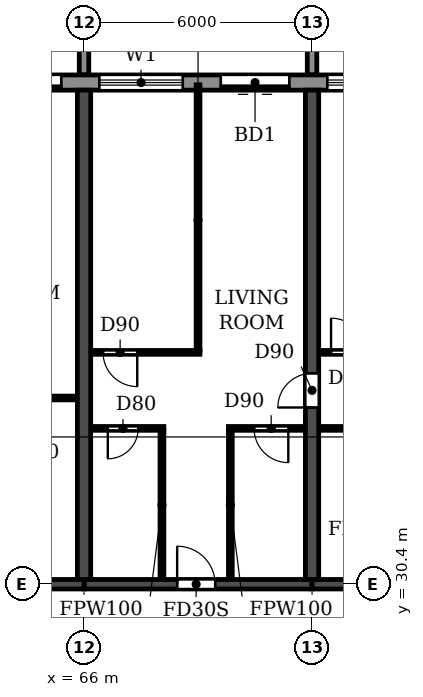
"""IFC4 building model, lengths in metres.
Left out: names, types, materials, properties, quantities, classifications, styles, units other than length and angle.
Written with IfcOpenShell. Run it as: python <this file> out.ifc"""

import sys

from ifc_helpers import new_model, si_unit, direction, frame, frame_2d, origin, place, context, subcontext, project, spatial, polyline, rectangle, outline, extrude, source, transform, mapped, element, fill, save


model = new_model("IFC4")
c1 = context("Model", 3, precision=1e-05, world=origin(), true_north=direction((0.0, 1.0)))
c2 = subcontext(c1, "Body", "Model", "MODEL_VIEW")
j1 = project(units=[si_unit("LENGTHUNIT", "METRE"), si_unit("PLANEANGLEUNIT", "RADIAN")], contexts=[c1])
p1 = place(None, origin())
s1 = spatial("IfcSite", under=j1, at=p1, CompositionType="ELEMENT")
p2 = place(p1, origin())
s2 = spatial("IfcBuilding", under=s1, at=p2, CompositionType="ELEMENT")
p3 = place(p2, frame((0.0, 0.0, 112.5)))
s3 = spatial("IfcBuildingStorey", under=s2, at=p3, CompositionType="ELEMENT", Elevation=112.5)
p4 = place(p3, frame((66.0, 30.525, 0.0), z_axis=(0.0, 0.0, 1.0), x_axis=(0.0, 1.0, 0.0)))
e1 = element("IfcWall", 1, at=p4, inside=s3, PredefinedType="SHEAR", context=c2, shape_type="SweptSolid", body=[
    extrude(rectangle(XDim=12.875, YDim=0.35, at=frame_2d((6.438, 0.0))), origin(), (0.0, 0.0, 1.0), 2.95),
])
p5 = place(p3, frame((72.0, 30.525, 0.0), z_axis=(0.0, 0.0, 1.0), x_axis=(0.0, 1.0, 0.0)))
e2 = element("IfcWall", 2, at=p5, inside=s3, PredefinedType="SHEAR", context=c2, shape_type="SweptSolid", body=[
    extrude(rectangle(XDim=12.875, YDim=0.35, at=frame_2d((6.438, 0.0))), origin(), (0.0, 0.0, 1.0), 2.95),
])
p6 = place(p5, frame((4.525, 0.0, 0.0)))
e3 = element("IfcOpeningElement", 3, at=p6, cuts=e2, PredefinedType="OPENING", context=c2, shape_type="SweptSolid", body=[
    extrude(rectangle(XDim=0.9, YDim=2.1, at=frame_2d((0.45, 1.05))), frame((0.0, 0.185, 0.0), z_axis=(0.0, -1.0, 0.0), x_axis=(1.0, 0.0, 0.0)), (0.0, 0.0, 1.0), 0.37),
])
p7 = place(p3, frame((60.0, 30.4, 0.0), z_axis=(0.0, 0.0, 1.0), x_axis=(1.0, 0.0, 0.0)))
e4 = element("IfcWall", 4, at=p7, inside=s3, PredefinedType="SHEAR", context=c2, shape_type="SweptSolid", body=[
    extrude(rectangle(XDim=6.0, YDim=0.25, at=frame_2d((3.0, 0.0))), origin(), (0.0, 0.0, 1.0), 2.35),
])
p8 = place(p7, frame((2.45, 0.0, 0.0)))
e5 = element("IfcOpeningElement", 5, at=p8, cuts=e4, PredefinedType="OPENING", context=c2, shape_type="SweptSolid", body=[
    extrude(rectangle(XDim=1.0, YDim=2.1, at=frame_2d((0.5, 1.05))), frame((0.0, 0.135, 0.0), z_axis=(0.0, -1.0, 0.0), x_axis=(1.0, 0.0, 0.0)), (0.0, 0.0, 1.0), 0.27),
])
p9 = place(p3, frame((66.0, 30.4, 0.0), z_axis=(0.0, 0.0, 1.0), x_axis=(1.0, 0.0, 0.0)))
e6 = element("IfcWall", 6, at=p9, inside=s3, PredefinedType="SHEAR", context=c2, shape_type="SweptSolid", body=[
    extrude(rectangle(XDim=6.0, YDim=0.25, at=frame_2d((3.0, 0.0))), origin(), (0.0, 0.0, 1.0), 2.35),
])
p10 = place(p9, frame((2.45, 0.0, 0.0)))
e7 = element("IfcOpeningElement", 7, at=p10, cuts=e6, PredefinedType="OPENING", context=c2, shape_type="SweptSolid", body=[
    extrude(rectangle(XDim=1.0, YDim=2.1, at=frame_2d((0.5, 1.05))), frame((0.0, 0.135, 0.0), z_axis=(0.0, -1.0, 0.0), x_axis=(1.0, 0.0, 0.0)), (0.0, 0.0, 1.0), 0.27),
])
p11 = place(p3, frame((72.0, 30.4, 0.0), z_axis=(0.0, 0.0, 1.0), x_axis=(1.0, 0.0, 0.0)))
e8 = element("IfcWall", 8, at=p11, inside=s3, PredefinedType="SHEAR", context=c2, shape_type="SweptSolid", body=[
    extrude(rectangle(XDim=6.0, YDim=0.25, at=frame_2d((3.0, 0.0))), origin(), (0.0, 0.0, 1.0), 2.35),
])
p12 = place(p3, frame((85.317, 43.6, 0.0), z_axis=(0.0, 0.0, 1.0), x_axis=(-1.0, 0.0, 0.0)))
e9 = element("IfcWall", 9, at=p12, inside=s3, PredefinedType="STANDARD", context=c2, shape_type="SweptSolid", body=[
    extrude(rectangle(XDim=68.634, YDim=0.4, at=frame_2d((34.317, 0.0))), origin(), (0.0, 0.0, 1.0), 2.95),
])
p13 = place(p12, frame((64.917, 0.0, 0.0)))
e10 = element("IfcOpeningElement", 10, at=p13, cuts=e9, PredefinedType="OPENING", context=c2, shape_type="SweptSolid", body=[
    extrude(rectangle(XDim=1.8, YDim=2.4, at=frame_2d((0.9, 1.2))), frame((0.0, 0.21, 0.0), z_axis=(0.0, -1.0, 0.0), x_axis=(1.0, 0.0, 0.0)), (0.0, 0.0, 1.0), 0.42),
])
p14 = place(p12, frame((61.717, 0.0, 0.9)))
e11 = element("IfcOpeningElement", 11, at=p14, cuts=e9, PredefinedType="OPENING", context=c2, shape_type="SweptSolid", body=[
    extrude(rectangle(XDim=2.2, YDim=1.5, at=frame_2d((1.1, 0.75))), frame((0.0, 0.21, 0.0), z_axis=(0.0, -1.0, 0.0), x_axis=(1.0, 0.0, 0.0)), (0.0, 0.0, 1.0), 0.42),
])
p15 = place(p12, frame((58.717, 0.0, 0.9)))
e12 = element("IfcOpeningElement", 12, at=p15, cuts=e9, PredefinedType="OPENING", context=c2, shape_type="SweptSolid", body=[
    extrude(rectangle(XDim=2.2, YDim=1.5, at=frame_2d((1.1, 0.75))), frame((0.0, 0.21, 0.0), z_axis=(0.0, -1.0, 0.0), x_axis=(1.0, 0.0, 0.0)), (0.0, 0.0, 1.0), 0.42),
])
p16 = place(p12, frame((55.917, 0.0, 0.0)))
e13 = element("IfcOpeningElement", 13, at=p16, cuts=e9, PredefinedType="OPENING", context=c2, shape_type="SweptSolid", body=[
    extrude(rectangle(XDim=1.8, YDim=2.4, at=frame_2d((0.9, 1.2))), frame((0.0, 0.21, 0.0), z_axis=(0.0, -1.0, 0.0), x_axis=(1.0, 0.0, 0.0)), (0.0, 0.0, 1.0), 0.42),
])
p17 = place(p12, frame((52.917, 0.0, 0.0)))
e14 = element("IfcOpeningElement", 14, at=p17, cuts=e9, PredefinedType="OPENING", context=c2, shape_type="SweptSolid", body=[
    extrude(rectangle(XDim=1.8, YDim=2.4, at=frame_2d((0.9, 1.2))), frame((0.0, 0.21, 0.0), z_axis=(0.0, -1.0, 0.0), x_axis=(1.0, 0.0, 0.0)), (0.0, 0.0, 1.0), 0.42),
])
p18 = place(p12, frame((49.717, 0.0, 0.9)))
e15 = element("IfcOpeningElement", 15, at=p18, cuts=e9, PredefinedType="OPENING", context=c2, shape_type="SweptSolid", body=[
    extrude(rectangle(XDim=2.2, YDim=1.5, at=frame_2d((1.1, 0.75))), frame((0.0, 0.21, 0.0), z_axis=(0.0, -1.0, 0.0), x_axis=(1.0, 0.0, 0.0)), (0.0, 0.0, 1.0), 0.42),
])
p19 = place(p12, frame((46.717, 0.0, 0.9)))
e16 = element("IfcOpeningElement", 16, at=p19, cuts=e9, PredefinedType="OPENING", context=c2, shape_type="SweptSolid", body=[
    extrude(rectangle(XDim=2.2, YDim=1.5, at=frame_2d((1.1, 0.75))), frame((0.0, 0.21, 0.0), z_axis=(0.0, -1.0, 0.0), x_axis=(1.0, 0.0, 0.0)), (0.0, 0.0, 1.0), 0.42),
])
p20 = place(p12, frame((43.917, 0.0, 0.0)))
e17 = element("IfcOpeningElement", 17, at=p20, cuts=e9, PredefinedType="OPENING", context=c2, shape_type="SweptSolid", body=[
    extrude(rectangle(XDim=1.8, YDim=2.4, at=frame_2d((0.9, 1.2))), frame((0.0, 0.21, 0.0), z_axis=(0.0, -1.0, 0.0), x_axis=(1.0, 0.0, 0.0)), (0.0, 0.0, 1.0), 0.42),
])
p21 = place(p12, frame((40.717, 0.0, 0.9)))
e18 = element("IfcOpeningElement", 18, at=p21, cuts=e9, PredefinedType="OPENING", context=c2, shape_type="SweptSolid", body=[
    extrude(rectangle(XDim=2.2, YDim=1.5, at=frame_2d((1.1, 0.75))), frame((0.0, 0.21, 0.0), z_axis=(0.0, -1.0, 0.0), x_axis=(1.0, 0.0, 0.0)), (0.0, 0.0, 1.0), 0.42),
])
p22 = place(p12, frame((37.717, 0.0, 0.9)))
e19 = element("IfcOpeningElement", 19, at=p22, cuts=e9, PredefinedType="OPENING", context=c2, shape_type="SweptSolid", body=[
    extrude(rectangle(XDim=2.2, YDim=1.5, at=frame_2d((1.1, 0.75))), frame((0.0, 0.21, 0.0), z_axis=(0.0, -1.0, 0.0), x_axis=(1.0, 0.0, 0.0)), (0.0, 0.0, 1.0), 0.42),
])
p23 = place(p12, frame((34.917, 0.0, 0.0)))
e20 = element("IfcOpeningElement", 20, at=p23, cuts=e9, PredefinedType="OPENING", context=c2, shape_type="SweptSolid", body=[
    extrude(rectangle(XDim=1.8, YDim=2.4, at=frame_2d((0.9, 1.2))), frame((0.0, 0.21, 0.0), z_axis=(0.0, -1.0, 0.0), x_axis=(1.0, 0.0, 0.0)), (0.0, 0.0, 1.0), 0.42),
])
p24 = place(p12, frame((31.717, 0.0, 0.9)))
e21 = element("IfcOpeningElement", 21, at=p24, cuts=e9, PredefinedType="OPENING", context=c2, shape_type="SweptSolid", body=[
    extrude(rectangle(XDim=2.2, YDim=1.5, at=frame_2d((1.1, 0.75))), frame((0.0, 0.21, 0.0), z_axis=(0.0, -1.0, 0.0), x_axis=(1.0, 0.0, 0.0)), (0.0, 0.0, 1.0), 0.42),
])
p25 = place(p12, frame((28.917, 0.0, 0.0)))
e22 = element("IfcOpeningElement", 22, at=p25, cuts=e9, PredefinedType="OPENING", context=c2, shape_type="SweptSolid", body=[
    extrude(rectangle(XDim=1.8, YDim=2.4, at=frame_2d((0.9, 1.2))), frame((0.0, 0.21, 0.0), z_axis=(0.0, -1.0, 0.0), x_axis=(1.0, 0.0, 0.0)), (0.0, 0.0, 1.0), 0.42),
])
p26 = place(p12, frame((25.717, 0.0, 0.9)))
e23 = element("IfcOpeningElement", 23, at=p26, cuts=e9, PredefinedType="OPENING", context=c2, shape_type="SweptSolid", body=[
    extrude(rectangle(XDim=2.2, YDim=1.5, at=frame_2d((1.1, 0.75))), frame((0.0, 0.21, 0.0), z_axis=(0.0, -1.0, 0.0), x_axis=(1.0, 0.0, 0.0)), (0.0, 0.0, 1.0), 0.42),
])
p27 = place(p12, frame((22.717, 0.0, 0.9)))
e24 = element("IfcOpeningElement", 24, at=p27, cuts=e9, PredefinedType="OPENING", context=c2, shape_type="SweptSolid", body=[
    extrude(rectangle(XDim=2.2, YDim=1.5, at=frame_2d((1.1, 0.75))), frame((0.0, 0.21, 0.0), z_axis=(0.0, -1.0, 0.0), x_axis=(1.0, 0.0, 0.0)), (0.0, 0.0, 1.0), 0.42),
])
p28 = place(p12, frame((19.917, 0.0, 0.0)))
e25 = element("IfcOpeningElement", 25, at=p28, cuts=e9, PredefinedType="OPENING", context=c2, shape_type="SweptSolid", body=[
    extrude(rectangle(XDim=1.8, YDim=2.4, at=frame_2d((0.9, 1.2))), frame((0.0, 0.21, 0.0), z_axis=(0.0, -1.0, 0.0), x_axis=(1.0, 0.0, 0.0)), (0.0, 0.0, 1.0), 0.42),
])
p29 = place(p12, frame((16.717, 0.0, 0.9)))
e26 = element("IfcOpeningElement", 26, at=p29, cuts=e9, PredefinedType="OPENING", context=c2, shape_type="SweptSolid", body=[
    extrude(rectangle(XDim=2.2, YDim=1.5, at=frame_2d((1.1, 0.75))), frame((0.0, 0.21, 0.0), z_axis=(0.0, -1.0, 0.0), x_axis=(1.0, 0.0, 0.0)), (0.0, 0.0, 1.0), 0.42),
])
p30 = place(p12, frame((13.917, 0.0, 0.0)))
e27 = element("IfcOpeningElement", 27, at=p30, cuts=e9, PredefinedType="OPENING", context=c2, shape_type="SweptSolid", body=[
    extrude(rectangle(XDim=1.8, YDim=2.4, at=frame_2d((0.9, 1.2))), frame((0.0, 0.21, 0.0), z_axis=(0.0, -1.0, 0.0), x_axis=(1.0, 0.0, 0.0)), (0.0, 0.0, 1.0), 0.42),
])
p31 = place(p12, frame((10.717, 0.0, 0.9)))
e28 = element("IfcOpeningElement", 28, at=p31, cuts=e9, PredefinedType="OPENING", context=c2, shape_type="SweptSolid", body=[
    extrude(rectangle(XDim=2.2, YDim=1.5, at=frame_2d((1.1, 0.75))), frame((0.0, 0.21, 0.0), z_axis=(0.0, -1.0, 0.0), x_axis=(1.0, 0.0, 0.0)), (0.0, 0.0, 1.0), 0.42),
])
p32 = place(p12, frame((7.717, 0.0, 0.9)))
e29 = element("IfcOpeningElement", 29, at=p32, cuts=e9, PredefinedType="OPENING", context=c2, shape_type="SweptSolid", body=[
    extrude(rectangle(XDim=2.2, YDim=1.5, at=frame_2d((1.1, 0.75))), frame((0.0, 0.21, 0.0), z_axis=(0.0, -1.0, 0.0), x_axis=(1.0, 0.0, 0.0)), (0.0, 0.0, 1.0), 0.42),
])
p33 = place(p12, frame((4.917, 0.0, 0.0)))
e30 = element("IfcOpeningElement", 30, at=p33, cuts=e9, PredefinedType="OPENING", context=c2, shape_type="SweptSolid", body=[
    extrude(rectangle(XDim=1.8, YDim=2.4, at=frame_2d((0.9, 1.2))), frame((0.0, 0.21, 0.0), z_axis=(0.0, -1.0, 0.0), x_axis=(1.0, 0.0, 0.0)), (0.0, 0.0, 1.0), 0.42),
])
p34 = place(p12, frame((1.717, 0.0, 0.9)))
e31 = element("IfcOpeningElement", 31, at=p34, cuts=e9, PredefinedType="OPENING", context=c2, shape_type="SweptSolid", body=[
    extrude(rectangle(XDim=2.2, YDim=1.5, at=frame_2d((1.1, 0.75))), frame((0.0, 0.21, 0.0), z_axis=(0.0, -1.0, 0.0), x_axis=(1.0, 0.0, 0.0)), (0.0, 0.0, 1.0), 0.42),
])
m1 = source(origin(), c2, "Body", "SweptSolid", [
    extrude(outline(polyline([(0.0, 0.0), (0.25, 0.0), (0.25, 3.1), (0.0, 3.1), (0.0, 0.0)])), origin(), (0.0, 0.0, 1.0), 3.1),
])
for number, where in (
    (32, (65.875, 43.8, 0.0)),
    (33, (71.875, 43.8, 0.0)),
):
    element("IfcWall", number, at=place(p3, frame(where)), inside=s3, PredefinedType="STANDARD", context=c2, shape_type="MappedRepresentation", body=[
        mapped(m1, transform((0.0, 0.0, 0.0))),
    ])
p35 = place(p3, frame((66.185, 34.5, 0.0), z_axis=(0.0, 0.0, 1.0), x_axis=(1.0, 0.0, 0.0)))
e34 = element("IfcWall", 34, at=p35, inside=s3, PredefinedType="PARTITIONING", context=c2, shape_type="SweptSolid", body=[
    extrude(rectangle(XDim=1.915, YDim=0.1, at=frame_2d((0.958, 0.0))), origin(), (0.0, 0.0, 1.0), 2.95),
])
p36 = place(p35, frame((0.44, 0.0, 0.0)))
e35 = element("IfcOpeningElement", 35, at=p36, cuts=e34, PredefinedType="OPENING", context=c2, shape_type="SweptSolid", body=[
    extrude(rectangle(XDim=0.8, YDim=2.1, at=frame_2d((0.4, 1.05))), frame((0.0, 0.06, 0.0), z_axis=(0.0, -1.0, 0.0), x_axis=(1.0, 0.0, 0.0)), (0.0, 0.0, 1.0), 0.12),
])
p37 = place(p3, frame((69.8, 34.5, 0.0), z_axis=(0.0, 0.0, 1.0), x_axis=(1.0, 0.0, 0.0)))
e36 = element("IfcWall", 36, at=p37, inside=s3, PredefinedType="PARTITIONING", context=c2, shape_type="SweptSolid", body=[
    extrude(rectangle(XDim=2.015, YDim=0.1, at=frame_2d((1.007, 0.0))), origin(), (0.0, 0.0, 1.0), 2.95),
])
p38 = place(p37, frame((0.675, 0.0, 0.0)))
e37 = element("IfcOpeningElement", 37, at=p38, cuts=e36, PredefinedType="OPENING", context=c2, shape_type="SweptSolid", body=[
    extrude(rectangle(XDim=0.9, YDim=2.1, at=frame_2d((0.45, 1.05))), frame((0.0, 0.06, 0.0), z_axis=(0.0, -1.0, 0.0), x_axis=(1.0, 0.0, 0.0)), (0.0, 0.0, 1.0), 0.12),
])
p39 = place(p3, frame((72.185, 34.5, 0.0), z_axis=(0.0, 0.0, 1.0), x_axis=(1.0, 0.0, 0.0)))
e38 = element("IfcWall", 38, at=p39, inside=s3, PredefinedType="PARTITIONING", context=c2, shape_type="SweptSolid", body=[
    extrude(rectangle(XDim=5.63, YDim=0.1, at=frame_2d((2.815, 0.0))), origin(), (0.0, 0.0, 1.0), 2.95),
])
p40 = place(p39, frame((1.065, 0.0, 0.0)))
e39 = element("IfcOpeningElement", 39, at=p40, cuts=e38, PredefinedType="OPENING", context=c2, shape_type="SweptSolid", body=[
    extrude(rectangle(XDim=0.8, YDim=2.1, at=frame_2d((0.4, 1.05))), frame((0.0, 0.06, 0.0), z_axis=(0.0, -1.0, 0.0), x_axis=(1.0, 0.0, 0.0)), (0.0, 0.0, 1.0), 0.12),
])
p41 = place(p39, frame((4.065, 0.0, 0.0)))
e40 = element("IfcOpeningElement", 40, at=p41, cuts=e38, PredefinedType="OPENING", context=c2, shape_type="SweptSolid", body=[
    extrude(rectangle(XDim=0.8, YDim=2.1, at=frame_2d((0.4, 1.05))), frame((0.0, 0.06, 0.0), z_axis=(0.0, -1.0, 0.0), x_axis=(1.0, 0.0, 0.0)), (0.0, 0.0, 1.0), 0.12),
])
p42 = place(p3, frame((63.8, 35.3, 0.0), z_axis=(0.0, 0.0, 1.0), x_axis=(1.0, 0.0, 0.0)))
e41 = element("IfcWall", 41, at=p42, inside=s3, PredefinedType="PARTITIONING", context=c2, shape_type="SweptSolid", body=[
    extrude(rectangle(XDim=2.015, YDim=0.1, at=frame_2d((1.007, 0.0))), origin(), (0.0, 0.0, 1.0), 2.95),
])
p43 = place(p3, frame((66.185, 36.5, 0.0), z_axis=(0.0, 0.0, 1.0), x_axis=(1.0, 0.0, 0.0)))
e42 = element("IfcWall", 42, at=p43, inside=s3, PredefinedType="PARTITIONING", context=c2, shape_type="SweptSolid", body=[
    extrude(rectangle(XDim=2.865, YDim=0.1, at=frame_2d((1.433, 0.0))), origin(), (0.0, 0.0, 1.0), 2.95),
])
p44 = place(p43, frame((0.315, 0.0, 0.0)))
e43 = element("IfcOpeningElement", 43, at=p44, cuts=e42, PredefinedType="OPENING", context=c2, shape_type="SweptSolid", body=[
    extrude(rectangle(XDim=0.9, YDim=2.1, at=frame_2d((0.45, 1.05))), frame((0.0, 0.06, 0.0), z_axis=(0.0, -1.0, 0.0), x_axis=(1.0, 0.0, 0.0)), (0.0, 0.0, 1.0), 0.12),
])
p45 = place(p3, frame((72.185, 36.5, 0.0), z_axis=(0.0, 0.0, 1.0), x_axis=(1.0, 0.0, 0.0)))
e44 = element("IfcWall", 44, at=p45, inside=s3, PredefinedType="PARTITIONING", context=c2, shape_type="SweptSolid", body=[
    extrude(rectangle(XDim=5.63, YDim=0.1, at=frame_2d((2.815, 0.0))), origin(), (0.0, 0.0, 1.0), 2.95),
])
p46 = place(p45, frame((0.315, 0.0, 0.0)))
e45 = element("IfcOpeningElement", 45, at=p46, cuts=e44, PredefinedType="OPENING", context=c2, shape_type="SweptSolid", body=[
    extrude(rectangle(XDim=0.9, YDim=2.1, at=frame_2d((0.45, 1.05))), frame((0.0, 0.06, 0.0), z_axis=(0.0, -1.0, 0.0), x_axis=(1.0, 0.0, 0.0)), (0.0, 0.0, 1.0), 0.12),
])
p47 = place(p45, frame((4.415, 0.0, 0.0)))
e46 = element("IfcOpeningElement", 46, at=p47, cuts=e44, PredefinedType="OPENING", context=c2, shape_type="SweptSolid", body=[
    extrude(rectangle(XDim=0.9, YDim=2.1, at=frame_2d((0.45, 1.05))), frame((0.0, 0.06, 0.0), z_axis=(0.0, -1.0, 0.0), x_axis=(1.0, 0.0, 0.0)), (0.0, 0.0, 1.0), 0.12),
])
p48 = place(p3, frame((68.05, 30.535, 0.0), z_axis=(0.0, 0.0, 1.0), x_axis=(0.0, 1.0, 0.0)))
e47 = element("IfcWall", 47, at=p48, inside=s3, PredefinedType="PARTITIONING", context=c2, shape_type="SweptSolid", body=[
    extrude(rectangle(XDim=3.915, YDim=0.1, at=frame_2d((1.958, 0.0))), origin(), (0.0, 0.0, 1.0), 2.95),
])
p49 = place(p3, frame((69.0, 36.55, 0.0), z_axis=(0.0, 0.0, 1.0), x_axis=(0.0, 1.0, 0.0)))
e48 = element("IfcWall", 48, at=p49, inside=s3, PredefinedType="PARTITIONING", context=c2, shape_type="SweptSolid", body=[
    extrude(rectangle(XDim=6.99, YDim=0.1, at=frame_2d((3.495, 0.0))), origin(), (0.0, 0.0, 1.0), 2.95),
])
p50 = place(p3, frame((69.85, 30.535, 0.0), z_axis=(0.0, 0.0, 1.0), x_axis=(0.0, 1.0, 0.0)))
e49 = element("IfcWall", 49, at=p50, inside=s3, PredefinedType="PARTITIONING", context=c2, shape_type="SweptSolid", body=[
    extrude(rectangle(XDim=3.915, YDim=0.1, at=frame_2d((1.958, 0.0))), origin(), (0.0, 0.0, 1.0), 2.95),
])
p51 = place(p28, origin())
e50 = element("IfcDoor", 50, at=p51, inside=s3, OperationType="DOUBLE_DOOR_SLIDING", PredefinedType="DOOR", context=c2, shape_type="SweptSolid", body=[
    extrude(rectangle(XDim=1.8, YDim=2.4, at=frame_2d((0.9, 1.2))), frame((0.0, 0.025, 0.0), z_axis=(0.0, -1.0, 0.0), x_axis=(1.0, 0.0, 0.0)), (0.0, 0.0, 1.0), 0.05),
])
fill(e25, e50)
p52 = place(p29, origin())
e51 = element("IfcWindow", 51, at=p52, inside=s3, PartitioningType="DOUBLE_PANEL_HORIZONTAL", PredefinedType="WINDOW", context=c2, shape_type="SweptSolid", body=[
    extrude(rectangle(XDim=2.2, YDim=1.5, at=frame_2d((1.1, 0.75))), frame((0.0, 0.03, 0.0), z_axis=(0.0, -1.0, 0.0), x_axis=(1.0, 0.0, 0.0)), (0.0, 0.0, 1.0), 0.06),
])
fill(e26, e51)
p53 = place(p30, origin())
e52 = element("IfcDoor", 52, at=p53, inside=s3, OperationType="DOUBLE_DOOR_SLIDING", PredefinedType="DOOR", context=c2, shape_type="SweptSolid", body=[
    extrude(rectangle(XDim=1.8, YDim=2.4, at=frame_2d((0.9, 1.2))), frame((0.0, 0.025, 0.0), z_axis=(0.0, -1.0, 0.0), x_axis=(1.0, 0.0, 0.0)), (0.0, 0.0, 1.0), 0.05),
])
fill(e27, e52)
p54 = place(p31, origin())
e53 = element("IfcWindow", 53, at=p54, inside=s3, PartitioningType="DOUBLE_PANEL_HORIZONTAL", PredefinedType="WINDOW", context=c2, shape_type="SweptSolid", body=[
    extrude(rectangle(XDim=2.2, YDim=1.5, at=frame_2d((1.1, 0.75))), frame((0.0, 0.03, 0.0), z_axis=(0.0, -1.0, 0.0), x_axis=(1.0, 0.0, 0.0)), (0.0, 0.0, 1.0), 0.06),
])
fill(e28, e53)
p55 = place(p46, origin())
e54 = element("IfcDoor", 54, at=p55, inside=s3, OperationType="SINGLE_SWING_LEFT", PredefinedType="DOOR", context=c2, shape_type="SweptSolid", body=[
    extrude(rectangle(XDim=0.9, YDim=2.1, at=frame_2d((0.45, 1.05))), frame((0.0, 0.025, 0.0), z_axis=(0.0, -1.0, 0.0), x_axis=(1.0, 0.0, 0.0)), (0.0, 0.0, 1.0), 0.05),
])
fill(e45, e54)
p56 = place(p44, frame((0.9, 0.0, 0.0), z_axis=(0.0, 0.0, 1.0), x_axis=(-1.0, 0.0, 0.0)))
e55 = element("IfcDoor", 55, at=p56, inside=s3, OperationType="SINGLE_SWING_LEFT", PredefinedType="DOOR", context=c2, shape_type="SweptSolid", body=[
    extrude(rectangle(XDim=0.9, YDim=2.1, at=frame_2d((0.45, 1.05))), frame((0.0, 0.025, 0.0), z_axis=(0.0, -1.0, 0.0), x_axis=(1.0, 0.0, 0.0)), (0.0, 0.0, 1.0), 0.05),
])
fill(e43, e55)
p57 = place(p36, frame((0.8, 0.0, 0.0), z_axis=(0.0, 0.0, 1.0), x_axis=(-1.0, 0.0, 0.0)))
e56 = element("IfcDoor", 56, at=p57, inside=s3, OperationType="SINGLE_SWING_RIGHT", PredefinedType="DOOR", context=c2, shape_type="SweptSolid", body=[
    extrude(rectangle(XDim=0.8, YDim=2.1, at=frame_2d((0.4, 1.05))), frame((0.0, 0.025, 0.0), z_axis=(0.0, -1.0, 0.0), x_axis=(1.0, 0.0, 0.0)), (0.0, 0.0, 1.0), 0.05),
])
fill(e35, e56)
p58 = place(p10, origin())
e57 = element("IfcDoor", 57, at=p58, inside=s3, OperationType="SINGLE_SWING_LEFT", PredefinedType="DOOR", context=c2, shape_type="SweptSolid", body=[
    extrude(rectangle(XDim=1.0, YDim=2.1, at=frame_2d((0.5, 1.05))), frame((0.0, 0.025, 0.0), z_axis=(0.0, -1.0, 0.0), x_axis=(1.0, 0.0, 0.0)), (0.0, 0.0, 1.0), 0.05),
])
fill(e7, e57)
p59 = place(p38, frame((0.9, 0.0, 0.0), z_axis=(0.0, 0.0, 1.0), x_axis=(-1.0, 0.0, 0.0)))
e58 = element("IfcDoor", 58, at=p59, inside=s3, OperationType="SINGLE_SWING_LEFT", PredefinedType="DOOR", context=c2, shape_type="SweptSolid", body=[
    extrude(rectangle(XDim=0.9, YDim=2.1, at=frame_2d((0.45, 1.05))), frame((0.0, 0.025, 0.0), z_axis=(0.0, -1.0, 0.0), x_axis=(1.0, 0.0, 0.0)), (0.0, 0.0, 1.0), 0.05),
])
fill(e37, e58)
p60 = place(p6, origin())
e59 = element("IfcDoor", 59, at=p60, inside=s3, OperationType="SINGLE_SWING_LEFT", PredefinedType="DOOR", context=c2, shape_type="SweptSolid", body=[
    extrude(rectangle(XDim=0.9, YDim=2.1, at=frame_2d((0.45, 1.05))), frame((0.0, 0.025, 0.0), z_axis=(0.0, -1.0, 0.0), x_axis=(1.0, 0.0, 0.0)), (0.0, 0.0, 1.0), 0.05),
])
fill(e3, e59)
save(model, sys.argv[1])
